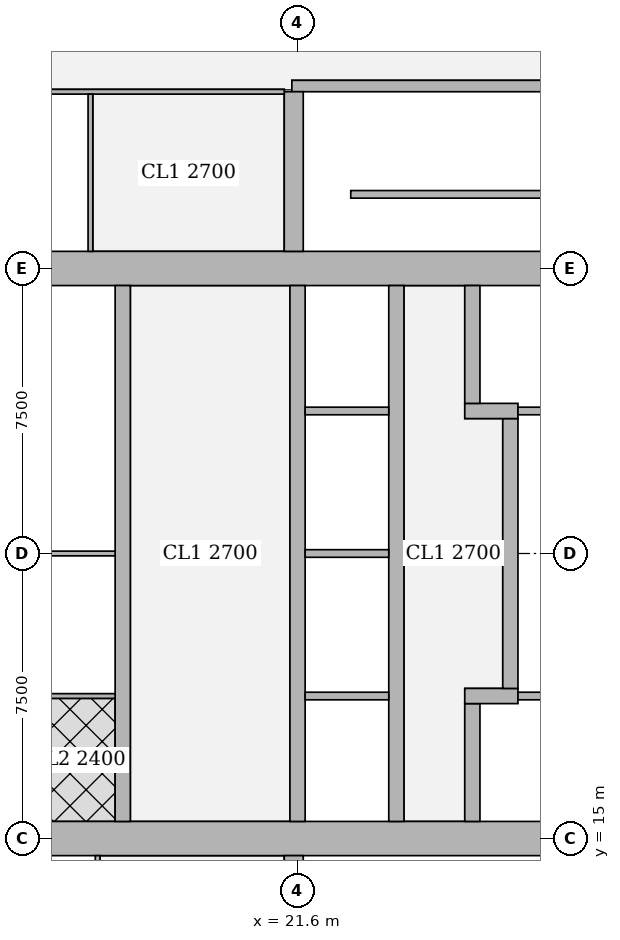
"""IFC4 building model, lengths in metres.
Left out: names, types, materials, properties, quantities, classifications, styles, units other than length and angle.
Written with IfcOpenShell. Run it as: python <this file> out.ifc"""

import sys

from ifc_helpers import new_model, si_unit, direction, frame, frame_2d, origin, place, context, subcontext, project, spatial, rectangle, extrude, element, fill, save


model = new_model("IFC4")
c1 = context("Model", 3, precision=1e-05, world=origin(), true_north=direction((0.0, 1.0)))
c2 = subcontext(c1, "Body", "Model", "MODEL_VIEW")
j1 = project(units=[si_unit("LENGTHUNIT", "METRE"), si_unit("PLANEANGLEUNIT", "RADIAN")], contexts=[c1])
p1 = place(None, origin())
s1 = spatial("IfcSite", under=j1, at=p1, CompositionType="ELEMENT")
p2 = place(p1, origin())
s2 = spatial("IfcBuilding", under=s1, at=p2, CompositionType="ELEMENT")
p3 = place(p2, frame((0.0, 0.0, 139.55)))
s3 = spatial("IfcBuildingStorey", under=s2, at=p3, CompositionType="ELEMENT", Elevation=139.55)
p4 = place(p3, frame((13.95, 15.0, 0.0), z_axis=(0.0, 0.0, 1.0), x_axis=(1.0, 0.0, 0.0)))
e1 = element("IfcWall", 1, at=p4, inside=s3, PredefinedType="SHEAR", context=c2, shape_type="SweptSolid", body=[
    extrude(rectangle(XDim=15.3, YDim=0.9, at=frame_2d((7.65, 0.0))), origin(), (0.0, 0.0, 1.0), 3.75),
])
p5 = place(p4, frame((4.45, 0.0, 0.0)))
e2 = element("IfcOpeningElement", 2, at=p5, cuts=e1, PredefinedType="OPENING", context=c2, shape_type="SweptSolid", body=[
    extrude(rectangle(XDim=1.8, YDim=2.1, at=frame_2d((0.9, 1.05))), frame((0.0, 0.46, 0.0), z_axis=(0.0, -1.0, 0.0), x_axis=(1.0, 0.0, 0.0)), (0.0, 0.0, 1.0), 0.92),
])
p6 = place(p4, frame((10.7, 0.0, 0.0)))
e3 = element("IfcOpeningElement", 3, at=p6, cuts=e1, PredefinedType="OPENING", context=c2, shape_type="SweptSolid", body=[
    extrude(rectangle(XDim=1.1, YDim=2.1, at=frame_2d((0.55, 1.05))), frame((0.0, 0.46, 0.0), z_axis=(0.0, -1.0, 0.0), x_axis=(1.0, 0.0, 0.0)), (0.0, 0.0, 1.0), 0.92),
])
p7 = place(p3, frame((13.95, 30.0, 0.0), z_axis=(0.0, 0.0, 1.0), x_axis=(1.0, 0.0, 0.0)))
e4 = element("IfcWall", 4, at=p7, inside=s3, PredefinedType="SHEAR", context=c2, shape_type="SweptSolid", body=[
    extrude(rectangle(XDim=15.3, YDim=0.9, at=frame_2d((7.65, 0.0))), origin(), (0.0, 0.0, 1.0), 3.75),
])
p8 = place(p7, frame((4.45, 0.0, 0.0)))
e5 = element("IfcOpeningElement", 5, at=p8, cuts=e4, PredefinedType="OPENING", context=c2, shape_type="SweptSolid", body=[
    extrude(rectangle(XDim=1.8, YDim=2.1, at=frame_2d((0.9, 1.05))), frame((0.0, 0.46, 0.0), z_axis=(0.0, -1.0, 0.0), x_axis=(1.0, 0.0, 0.0)), (0.0, 0.0, 1.0), 0.92),
])
p9 = place(p7, frame((10.7, 0.0, 0.0)))
e6 = element("IfcOpeningElement", 6, at=p9, cuts=e4, PredefinedType="OPENING", context=c2, shape_type="SweptSolid", body=[
    extrude(rectangle(XDim=1.1, YDim=2.1, at=frame_2d((0.55, 1.05))), frame((0.0, 0.46, 0.0), z_axis=(0.0, -1.0, 0.0), x_axis=(1.0, 0.0, 0.0)), (0.0, 0.0, 1.0), 0.92),
])
p10 = place(p3, frame((17.0, 15.45, 0.0), z_axis=(0.0, 0.0, 1.0), x_axis=(0.0, 1.0, 0.0)))
e7 = element("IfcWall", 7, at=p10, inside=s3, PredefinedType="SHEAR", context=c2, shape_type="SweptSolid", body=[
    extrude(rectangle(XDim=14.1, YDim=0.4, at=frame_2d((7.05, 0.0))), origin(), (0.0, 0.0, 1.0), 3.75),
])
p11 = place(p10, frame((0.925, 0.0, 0.0)))
e8 = element("IfcOpeningElement", 8, at=p11, cuts=e7, PredefinedType="OPENING", context=c2, shape_type="SweptSolid", body=[
    extrude(rectangle(XDim=1.0, YDim=2.1, at=frame_2d((0.5, 1.05))), frame((0.0, 0.21, 0.0), z_axis=(0.0, -1.0, 0.0), x_axis=(1.0, 0.0, 0.0)), (0.0, 0.0, 1.0), 0.42),
])
p12 = place(p10, frame((4.675, 0.0, 0.0)))
e9 = element("IfcOpeningElement", 9, at=p12, cuts=e7, PredefinedType="OPENING", context=c2, shape_type="SweptSolid", body=[
    extrude(rectangle(XDim=1.0, YDim=2.1, at=frame_2d((0.5, 1.05))), frame((0.0, 0.21, 0.0), z_axis=(0.0, -1.0, 0.0), x_axis=(1.0, 0.0, 0.0)), (0.0, 0.0, 1.0), 0.42),
])
p13 = place(p10, frame((8.425, 0.0, 0.0)))
e10 = element("IfcOpeningElement", 10, at=p13, cuts=e7, PredefinedType="OPENING", context=c2, shape_type="SweptSolid", body=[
    extrude(rectangle(XDim=1.0, YDim=2.1, at=frame_2d((0.5, 1.05))), frame((0.0, 0.21, 0.0), z_axis=(0.0, -1.0, 0.0), x_axis=(1.0, 0.0, 0.0)), (0.0, 0.0, 1.0), 0.42),
])
p14 = place(p10, frame((12.175, 0.0, 0.0)))
e11 = element("IfcOpeningElement", 11, at=p14, cuts=e7, PredefinedType="OPENING", context=c2, shape_type="SweptSolid", body=[
    extrude(rectangle(XDim=1.0, YDim=2.1, at=frame_2d((0.5, 1.05))), frame((0.0, 0.21, 0.0), z_axis=(0.0, -1.0, 0.0), x_axis=(1.0, 0.0, 0.0)), (0.0, 0.0, 1.0), 0.42),
])
p15 = place(p3, frame((21.6, 15.45, 0.0), z_axis=(0.0, 0.0, 1.0), x_axis=(0.0, 1.0, 0.0)))
e12 = element("IfcWall", 12, at=p15, inside=s3, PredefinedType="SHEAR", context=c2, shape_type="SweptSolid", body=[
    extrude(rectangle(XDim=14.1, YDim=0.4, at=frame_2d((7.05, 0.0))), origin(), (0.0, 0.0, 1.0), 3.75),
])
p16 = place(p15, frame((0.875, 0.0, 0.0)))
e13 = element("IfcOpeningElement", 13, at=p16, cuts=e12, PredefinedType="OPENING", context=c2, shape_type="SweptSolid", body=[
    extrude(rectangle(XDim=1.1, YDim=2.1, at=frame_2d((0.55, 1.05))), frame((0.0, 0.21, 0.0), z_axis=(0.0, -1.0, 0.0), x_axis=(1.0, 0.0, 0.0)), (0.0, 0.0, 1.0), 0.42),
])
p17 = place(p15, frame((4.625, 0.0, 0.0)))
e14 = element("IfcOpeningElement", 14, at=p17, cuts=e12, PredefinedType="OPENING", context=c2, shape_type="SweptSolid", body=[
    extrude(rectangle(XDim=1.1, YDim=2.1, at=frame_2d((0.55, 1.05))), frame((0.0, 0.21, 0.0), z_axis=(0.0, -1.0, 0.0), x_axis=(1.0, 0.0, 0.0)), (0.0, 0.0, 1.0), 0.42),
])
p18 = place(p15, frame((8.375, 0.0, 0.0)))
e15 = element("IfcOpeningElement", 15, at=p18, cuts=e12, PredefinedType="OPENING", context=c2, shape_type="SweptSolid", body=[
    extrude(rectangle(XDim=1.1, YDim=2.1, at=frame_2d((0.55, 1.05))), frame((0.0, 0.21, 0.0), z_axis=(0.0, -1.0, 0.0), x_axis=(1.0, 0.0, 0.0)), (0.0, 0.0, 1.0), 0.42),
])
p19 = place(p15, frame((12.125, 0.0, 0.0)))
e16 = element("IfcOpeningElement", 16, at=p19, cuts=e12, PredefinedType="OPENING", context=c2, shape_type="SweptSolid", body=[
    extrude(rectangle(XDim=1.1, YDim=2.1, at=frame_2d((0.55, 1.05))), frame((0.0, 0.21, 0.0), z_axis=(0.0, -1.0, 0.0), x_axis=(1.0, 0.0, 0.0)), (0.0, 0.0, 1.0), 0.42),
])
p20 = place(p3, frame((24.2, 15.45, 0.0), z_axis=(0.0, 0.0, 1.0), x_axis=(0.0, 1.0, 0.0)))
e17 = element("IfcWall", 17, at=p20, inside=s3, PredefinedType="SHEAR", context=c2, shape_type="SweptSolid", body=[
    extrude(rectangle(XDim=14.1, YDim=0.4, at=frame_2d((7.05, 0.0))), origin(), (0.0, 0.0, 1.0), 3.75),
])
p21 = place(p3, frame((26.2, 15.45, 0.0), z_axis=(0.0, 0.0, 1.0), x_axis=(0.0, 1.0, 0.0)))
e18 = element("IfcWall", 18, at=p21, inside=s3, PredefinedType="SHEAR", context=c2, shape_type="SweptSolid", body=[
    extrude(rectangle(XDim=3.1, YDim=0.4, at=frame_2d((1.55, 0.0))), origin(), (0.0, 0.0, 1.0), 3.75),
])
p22 = place(p21, frame((0.825, 0.0, 0.0)))
e19 = element("IfcOpeningElement", 19, at=p22, cuts=e18, PredefinedType="OPENING", context=c2, shape_type="SweptSolid", body=[
    extrude(rectangle(XDim=1.2, YDim=2.1, at=frame_2d((0.6, 1.05))), frame((0.0, 0.21, 0.0), z_axis=(0.0, -1.0, 0.0), x_axis=(1.0, 0.0, 0.0)), (0.0, 0.0, 1.0), 0.42),
])
p23 = place(p3, frame((26.0, 18.75, 0.0), z_axis=(0.0, 0.0, 1.0), x_axis=(1.0, 0.0, 0.0)))
e20 = element("IfcWall", 20, at=p23, inside=s3, PredefinedType="SHEAR", context=c2, shape_type="SweptSolid", body=[
    extrude(rectangle(XDim=1.4, YDim=0.4, at=frame_2d((0.7, 0.0))), origin(), (0.0, 0.0, 1.0), 3.75),
])
p24 = place(p3, frame((27.2, 18.95, 0.0), z_axis=(0.0, 0.0, 1.0), x_axis=(0.0, 1.0, 0.0)))
e21 = element("IfcWall", 21, at=p24, inside=s3, PredefinedType="SHEAR", context=c2, shape_type="SweptSolid", body=[
    extrude(rectangle(XDim=7.1, YDim=0.4, at=frame_2d((3.55, 0.0))), origin(), (0.0, 0.0, 1.0), 3.75),
])
p25 = place(p3, frame((26.0, 26.25, 0.0), z_axis=(0.0, 0.0, 1.0), x_axis=(1.0, 0.0, 0.0)))
e22 = element("IfcWall", 22, at=p25, inside=s3, PredefinedType="SHEAR", context=c2, shape_type="SweptSolid", body=[
    extrude(rectangle(XDim=1.4, YDim=0.4, at=frame_2d((0.7, 0.0))), origin(), (0.0, 0.0, 1.0), 3.75),
])
p26 = place(p3, frame((26.2, 26.45, 0.0), z_axis=(0.0, 0.0, 1.0), x_axis=(0.0, 1.0, 0.0)))
e23 = element("IfcWall", 23, at=p26, inside=s3, PredefinedType="SHEAR", context=c2, shape_type="SweptSolid", body=[
    extrude(rectangle(XDim=3.1, YDim=0.4, at=frame_2d((1.55, 0.0))), origin(), (0.0, 0.0, 1.0), 3.75),
])
p27 = place(p26, frame((1.075, 0.0, 0.0)))
e24 = element("IfcOpeningElement", 24, at=p27, cuts=e23, PredefinedType="OPENING", context=c2, shape_type="SweptSolid", body=[
    extrude(rectangle(XDim=1.2, YDim=2.1, at=frame_2d((0.6, 1.05))), frame((0.0, 0.21, 0.0), z_axis=(0.0, -1.0, 0.0), x_axis=(1.0, 0.0, 0.0)), (0.0, 0.0, 1.0), 0.42),
])
p28 = place(p3, frame((21.5, 10.35, 0.0), z_axis=(0.0, 0.0, 1.0), x_axis=(0.0, 1.0, 0.0)))
e25 = element("IfcWall", 25, at=p28, inside=s3, PredefinedType="SHEAR", context=c2, shape_type="SweptSolid", body=[
    extrude(rectangle(XDim=4.2, YDim=0.5, at=frame_2d((2.1, 0.0))), origin(), (0.0, 0.0, 1.0), 3.75),
])
p29 = place(p3, frame((21.45, 34.8, 0.0), z_axis=(0.0, 0.0, 1.0), x_axis=(1.0, 0.0, 0.0)))
e26 = element("IfcWall", 26, at=p29, inside=s3, PredefinedType="SHEAR", context=c2, shape_type="SweptSolid", body=[
    extrude(rectangle(XDim=7.5, YDim=0.3, at=frame_2d((3.75, 0.0))), origin(), (0.0, 0.0, 1.0), 3.75),
])
p30 = place(p29, frame((0.5, 0.0, 0.0)))
e27 = element("IfcOpeningElement", 27, at=p30, cuts=e26, PredefinedType="OPENING", context=c2, shape_type="SweptSolid", body=[
    extrude(rectangle(XDim=1.1, YDim=2.1, at=frame_2d((0.55, 1.05))), frame((0.0, 0.16, 0.0), z_axis=(0.0, -1.0, 0.0), x_axis=(1.0, 0.0, 0.0)), (0.0, 0.0, 1.0), 0.32),
])
p31 = place(p3, frame((21.5, 30.45, 0.0), z_axis=(0.0, 0.0, 1.0), x_axis=(0.0, 1.0, 0.0)))
e28 = element("IfcWall", 28, at=p31, inside=s3, PredefinedType="SHEAR", context=c2, shape_type="SweptSolid", body=[
    extrude(rectangle(XDim=4.2, YDim=0.5, at=frame_2d((2.1, 0.0))), origin(), (0.0, 0.0, 1.0), 3.75),
])
p32 = place(p3, frame((10.413, 34.65, 0.0), z_axis=(0.0, 0.0, 1.0), x_axis=(1.0, 0.0, 0.0)))
e29 = element("IfcWall", 29, at=p32, inside=s3, PredefinedType="PARTITIONING", context=c2, shape_type="SweptSolid", body=[
    extrude(rectangle(XDim=10.837, YDim=0.125, at=frame_2d((5.418, 0.0))), origin(), (0.0, 0.0, 1.0), 3.5),
])
p33 = place(p32, frame((7.487, 0.0, 0.0)))
e30 = element("IfcOpeningElement", 30, at=p33, cuts=e29, PredefinedType="OPENING", context=c2, shape_type="SweptSolid", body=[
    extrude(rectangle(XDim=1.8, YDim=2.1, at=frame_2d((0.9, 1.05))), frame((0.0, 0.073, 0.0), z_axis=(0.0, -1.0, 0.0), x_axis=(1.0, 0.0, 0.0)), (0.0, 0.0, 1.0), 0.145),
])
p34 = place(p3, frame((16.34, 10.413, 0.0), z_axis=(0.0, 0.0, 1.0), x_axis=(0.0, 1.0, 0.0)))
e31 = element("IfcWall", 31, at=p34, inside=s3, PredefinedType="PARTITIONING", context=c2, shape_type="SweptSolid", body=[
    extrude(rectangle(XDim=4.137, YDim=0.125, at=frame_2d((2.068, 0.0))), origin(), (0.0, 0.0, 1.0), 3.5),
])
p35 = place(p34, frame((1.512, 0.0, 0.0)))
e32 = element("IfcOpeningElement", 32, at=p35, cuts=e31, PredefinedType="OPENING", context=c2, shape_type="SweptSolid", body=[
    extrude(rectangle(XDim=1.0, YDim=2.1, at=frame_2d((0.5, 1.05))), frame((0.0, 0.073, 0.0), z_axis=(0.0, -1.0, 0.0), x_axis=(1.0, 0.0, 0.0)), (0.0, 0.0, 1.0), 0.145),
])
p36 = place(p3, frame((16.15, 30.45, 0.0), z_axis=(0.0, 0.0, 1.0), x_axis=(0.0, 1.0, 0.0)))
e33 = element("IfcWall", 33, at=p36, inside=s3, PredefinedType="PARTITIONING", context=c2, shape_type="SweptSolid", body=[
    extrude(rectangle(XDim=4.137, YDim=0.125, at=frame_2d((2.068, 0.0))), origin(), (0.0, 0.0, 1.0), 3.5),
])
p37 = place(p36, frame((1.625, 0.0, 0.0)))
e34 = element("IfcOpeningElement", 34, at=p37, cuts=e33, PredefinedType="OPENING", context=c2, shape_type="SweptSolid", body=[
    extrude(rectangle(XDim=1.0, YDim=2.1, at=frame_2d((0.5, 1.05))), frame((0.0, 0.073, 0.0), z_axis=(0.0, -1.0, 0.0), x_axis=(1.0, 0.0, 0.0)), (0.0, 0.0, 1.0), 0.145),
])
for number, where, z_axis, x_axis in (
    (35, (14.85, 18.75, 0.0), (0.0, 0.0, 1.0), (1.0, 0.0, 0.0)),
    (36, (14.85, 22.5, 0.0), (0.0, 0.0, 1.0), (1.0, 0.0, 0.0)),
):
    element("IfcWall", number, at=place(p3, frame(where, z_axis=z_axis, x_axis=x_axis)), inside=s3, PredefinedType="PARTITIONING", context=c2, shape_type="SweptSolid", body=[
        extrude(rectangle(XDim=1.95, YDim=0.125, at=frame_2d((0.975, 0.0))), origin(), (0.0, 0.0, 1.0), 3.5),
    ])
p38 = place(p3, frame((23.0, 31.95, 0.0), z_axis=(0.0, 0.0, 1.0), x_axis=(1.0, 0.0, 0.0)))
e37 = element("IfcWall", 37, at=p38, inside=s3, PredefinedType="SHEAR", context=c2, shape_type="SweptSolid", body=[
    extrude(rectangle(XDim=5.8, YDim=0.2, at=frame_2d((2.9, 0.0))), origin(), (0.0, 0.0, 1.0), 3.75),
])
for number, where, z_axis, x_axis in (
    (38, (21.8, 18.75, 0.0), (0.0, 0.0, 1.0), (1.0, 0.0, 0.0)),
    (39, (21.8, 22.5, 0.0), (0.0, 0.0, 1.0), (1.0, 0.0, 0.0)),
    (40, (21.8, 26.25, 0.0), (0.0, 0.0, 1.0), (1.0, 0.0, 0.0)),
):
    element("IfcWall", number, at=place(p3, frame(where, z_axis=z_axis, x_axis=x_axis)), inside=s3, PredefinedType="SOLIDWALL", context=c2, shape_type="SweptSolid", body=[
        extrude(rectangle(XDim=2.2, YDim=0.2, at=frame_2d((1.1, 0.0))), origin(), (0.0, 0.0, 1.0), 3.5),
    ])
for number, where, z_axis, x_axis in (
    (41, (27.4, 18.75, 0.0), (0.0, 0.0, 1.0), (1.0, 0.0, 0.0)),
    (42, (27.4, 26.25, 0.0), (0.0, 0.0, 1.0), (1.0, 0.0, 0.0)),
):
    element("IfcWall", number, at=place(p3, frame(where, z_axis=z_axis, x_axis=x_axis)), inside=s3, PredefinedType="SOLIDWALL", context=c2, shape_type="SweptSolid", body=[
        extrude(rectangle(XDim=0.95, YDim=0.2, at=frame_2d((0.475, 0.0))), origin(), (0.0, 0.0, 1.0), 3.5),
    ])
p39 = place(p37, origin())
e43 = element("IfcDoor", 43, at=p39, inside=s3, OperationType="SINGLE_SWING_RIGHT", PredefinedType="DOOR", context=c2, shape_type="SweptSolid", body=[
    extrude(rectangle(XDim=1.0, YDim=2.1, at=frame_2d((0.5, 1.05))), frame((0.0, 0.025, 0.0), z_axis=(0.0, -1.0, 0.0), x_axis=(1.0, 0.0, 0.0)), (0.0, 0.0, 1.0), 0.05),
])
fill(e34, e43)
p40 = place(p33, origin())
e44 = element("IfcDoor", 44, at=p40, inside=s3, OperationType="DOUBLE_DOOR_SINGLE_SWING", PredefinedType="DOOR", context=c2, shape_type="SweptSolid", body=[
    extrude(rectangle(XDim=1.8, YDim=2.1, at=frame_2d((0.9, 1.05))), frame((0.0, 0.025, 0.0), z_axis=(0.0, -1.0, 0.0), x_axis=(1.0, 0.0, 0.0)), (0.0, 0.0, 1.0), 0.05),
])
fill(e30, e44)
p41 = place(p11, origin())
e45 = element("IfcDoor", 45, at=p41, inside=s3, OperationType="SINGLE_SWING_LEFT", PredefinedType="DOOR", context=c2, shape_type="SweptSolid", body=[
    extrude(rectangle(XDim=1.0, YDim=2.1, at=frame_2d((0.5, 1.05))), frame((0.0, 0.025, 0.0), z_axis=(0.0, -1.0, 0.0), x_axis=(1.0, 0.0, 0.0)), (0.0, 0.0, 1.0), 0.05),
])
fill(e8, e45)
p42 = place(p12, origin())
e46 = element("IfcDoor", 46, at=p42, inside=s3, OperationType="SINGLE_SWING_LEFT", PredefinedType="DOOR", context=c2, shape_type="SweptSolid", body=[
    extrude(rectangle(XDim=1.0, YDim=2.1, at=frame_2d((0.5, 1.05))), frame((0.0, 0.025, 0.0), z_axis=(0.0, -1.0, 0.0), x_axis=(1.0, 0.0, 0.0)), (0.0, 0.0, 1.0), 0.05),
])
fill(e9, e46)
p43 = place(p13, origin())
e47 = element("IfcDoor", 47, at=p43, inside=s3, OperationType="SINGLE_SWING_LEFT", PredefinedType="DOOR", context=c2, shape_type="SweptSolid", body=[
    extrude(rectangle(XDim=1.0, YDim=2.1, at=frame_2d((0.5, 1.05))), frame((0.0, 0.025, 0.0), z_axis=(0.0, -1.0, 0.0), x_axis=(1.0, 0.0, 0.0)), (0.0, 0.0, 1.0), 0.05),
])
fill(e10, e47)
p44 = place(p14, origin())
e48 = element("IfcDoor", 48, at=p44, inside=s3, OperationType="SINGLE_SWING_RIGHT", PredefinedType="DOOR", context=c2, shape_type="SweptSolid", body=[
    extrude(rectangle(XDim=1.0, YDim=2.1, at=frame_2d((0.5, 1.05))), frame((0.0, 0.025, 0.0), z_axis=(0.0, -1.0, 0.0), x_axis=(1.0, 0.0, 0.0)), (0.0, 0.0, 1.0), 0.05),
])
fill(e11, e48)
p45 = place(p5, origin())
e49 = element("IfcDoor", 49, at=p45, inside=s3, OperationType="DOUBLE_DOOR_SINGLE_SWING", PredefinedType="DOOR", context=c2, shape_type="SweptSolid", body=[
    extrude(rectangle(XDim=1.8, YDim=2.1, at=frame_2d((0.9, 1.05))), frame((0.0, 0.025, 0.0), z_axis=(0.0, -1.0, 0.0), x_axis=(1.0, 0.0, 0.0)), (0.0, 0.0, 1.0), 0.05),
])
fill(e2, e49)
p46 = place(p6, origin())
e50 = element("IfcDoor", 50, at=p46, inside=s3, OperationType="SINGLE_SWING_RIGHT", PredefinedType="DOOR", context=c2, shape_type="SweptSolid", body=[
    extrude(rectangle(XDim=1.1, YDim=2.1, at=frame_2d((0.55, 1.05))), frame((0.0, 0.025, 0.0), z_axis=(0.0, -1.0, 0.0), x_axis=(1.0, 0.0, 0.0)), (0.0, 0.0, 1.0), 0.05),
])
fill(e3, e50)
p47 = place(p8, origin())
e51 = element("IfcDoor", 51, at=p47, inside=s3, OperationType="DOUBLE_DOOR_SINGLE_SWING", PredefinedType="DOOR", context=c2, shape_type="SweptSolid", body=[
    extrude(rectangle(XDim=1.8, YDim=2.1, at=frame_2d((0.9, 1.05))), frame((0.0, 0.025, 0.0), z_axis=(0.0, -1.0, 0.0), x_axis=(1.0, 0.0, 0.0)), (0.0, 0.0, 1.0), 0.05),
])
fill(e5, e51)
p48 = place(p9, origin())
e52 = element("IfcDoor", 52, at=p48, inside=s3, OperationType="SINGLE_SWING_RIGHT", PredefinedType="DOOR", context=c2, shape_type="SweptSolid", body=[
    extrude(rectangle(XDim=1.1, YDim=2.1, at=frame_2d((0.55, 1.05))), frame((0.0, 0.025, 0.0), z_axis=(0.0, -1.0, 0.0), x_axis=(1.0, 0.0, 0.0)), (0.0, 0.0, 1.0), 0.05),
])
fill(e6, e52)
p49 = place(p22, origin())
e53 = element("IfcDoor", 53, at=p49, inside=s3, OperationType="DOUBLE_DOOR_SLIDING", PredefinedType="DOOR", context=c2, shape_type="SweptSolid", body=[
    extrude(rectangle(XDim=1.2, YDim=2.1, at=frame_2d((0.6, 1.05))), frame((0.0, 0.025, 0.0), z_axis=(0.0, -1.0, 0.0), x_axis=(1.0, 0.0, 0.0)), (0.0, 0.0, 1.0), 0.05),
])
fill(e19, e53)
p50 = place(p27, origin())
e54 = element("IfcDoor", 54, at=p50, inside=s3, OperationType="DOUBLE_DOOR_SLIDING", PredefinedType="DOOR", context=c2, shape_type="SweptSolid", body=[
    extrude(rectangle(XDim=1.2, YDim=2.1, at=frame_2d((0.6, 1.05))), frame((0.0, 0.025, 0.0), z_axis=(0.0, -1.0, 0.0), x_axis=(1.0, 0.0, 0.0)), (0.0, 0.0, 1.0), 0.05),
])
fill(e24, e54)
p51 = place(p16, origin())
e55 = element("IfcDoor", 55, at=p51, inside=s3, OperationType="DOUBLE_DOOR_SLIDING", PredefinedType="DOOR", context=c2, shape_type="SweptSolid", body=[
    extrude(rectangle(XDim=1.1, YDim=2.1, at=frame_2d((0.55, 1.05))), frame((0.0, 0.025, 0.0), z_axis=(0.0, -1.0, 0.0), x_axis=(1.0, 0.0, 0.0)), (0.0, 0.0, 1.0), 0.05),
])
fill(e13, e55)
p52 = place(p17, origin())
e56 = element("IfcDoor", 56, at=p52, inside=s3, OperationType="DOUBLE_DOOR_SLIDING", PredefinedType="DOOR", context=c2, shape_type="SweptSolid", body=[
    extrude(rectangle(XDim=1.1, YDim=2.1, at=frame_2d((0.55, 1.05))), frame((0.0, 0.025, 0.0), z_axis=(0.0, -1.0, 0.0), x_axis=(1.0, 0.0, 0.0)), (0.0, 0.0, 1.0), 0.05),
])
fill(e14, e56)
p53 = place(p18, origin())
e57 = element("IfcDoor", 57, at=p53, inside=s3, OperationType="DOUBLE_DOOR_SLIDING", PredefinedType="DOOR", context=c2, shape_type="SweptSolid", body=[
    extrude(rectangle(XDim=1.1, YDim=2.1, at=frame_2d((0.55, 1.05))), frame((0.0, 0.025, 0.0), z_axis=(0.0, -1.0, 0.0), x_axis=(1.0, 0.0, 0.0)), (0.0, 0.0, 1.0), 0.05),
])
fill(e15, e57)
p54 = place(p19, origin())
e58 = element("IfcDoor", 58, at=p54, inside=s3, OperationType="DOUBLE_DOOR_SLIDING", PredefinedType="DOOR", context=c2, shape_type="SweptSolid", body=[
    extrude(rectangle(XDim=1.1, YDim=2.1, at=frame_2d((0.55, 1.05))), frame((0.0, 0.025, 0.0), z_axis=(0.0, -1.0, 0.0), x_axis=(1.0, 0.0, 0.0)), (0.0, 0.0, 1.0), 0.05),
])
fill(e16, e58)
p55 = place(p30, origin())
e59 = element("IfcDoor", 59, at=p55, inside=s3, OperationType="SINGLE_SWING_RIGHT", PredefinedType="DOOR", context=c2, shape_type="SweptSolid", body=[
    extrude(rectangle(XDim=1.1, YDim=2.1, at=frame_2d((0.55, 1.05))), frame((0.0, 0.025, 0.0), z_axis=(0.0, -1.0, 0.0), x_axis=(1.0, 0.0, 0.0)), (0.0, 0.0, 1.0), 0.05),
])
fill(e27, e59)
save(model, sys.argv[1])
